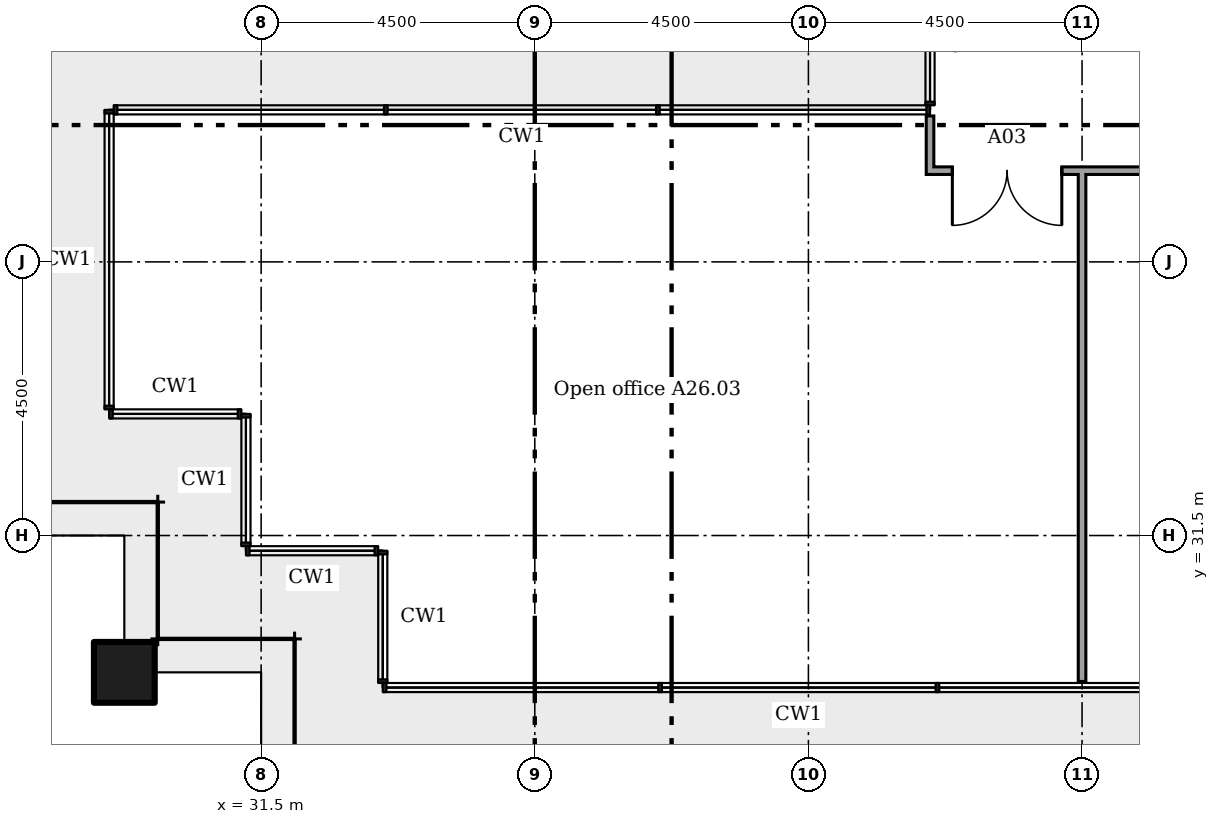
"""IFC4 building model, lengths in metres.
Left out: names, types, materials, properties, quantities, classifications, styles, units other than length and angle.
Written with IfcOpenShell. Run it as: python <this file> out.ifc"""

import sys

from ifc_helpers import new_model, si_unit, direction, frame, frame_2d, origin, origin_2d, place, context, subcontext, project, spatial, rectangle, extrude, element, fill, save


model = new_model("IFC4")
c1 = context("Model", 3, precision=1e-05, world=origin(), true_north=direction((0.0, 1.0)))
c2 = subcontext(c1, "Body", "Model", "MODEL_VIEW")
j1 = project(units=[si_unit("LENGTHUNIT", "METRE"), si_unit("PLANEANGLEUNIT", "RADIAN")], contexts=[c1])
p1 = place(None, origin())
s1 = spatial("IfcSite", under=j1, at=p1, CompositionType="ELEMENT")
p2 = place(p1, origin())
s2 = spatial("IfcBuilding", under=s1, at=p2, CompositionType="ELEMENT")
p3 = place(p2, frame((0.0, 0.0, 106.4)))
s3 = spatial("IfcBuildingStorey", under=s2, at=p3, CompositionType="ELEMENT", Elevation=106.4)
p4 = place(p3, frame((29.25, 29.25, 0.0)))
e1 = element("IfcColumn", 1, at=p4, inside=s3, PredefinedType="COLUMN", context=c2, shape_type="SweptSolid", body=[
    extrude(rectangle(XDim=1.0, YDim=1.0, at=origin_2d()), origin(), (0.0, 0.0, 1.0), 3.6),
])
p5 = place(p3, frame((42.438, 37.5, 0.0)))
e2 = element("IfcWall", 2, at=p5, inside=s3, PredefinedType="PARTITIONING", context=c2, shape_type="SweptSolid", body=[
    extrude(rectangle(XDim=18.525, YDim=0.125, at=frame_2d((9.262, 0.0))), origin(), (0.0, 0.0, 1.0), 3.45),
])
p6 = place(p5, frame((6.562, 0.0, 0.0)))
e3 = element("IfcOpeningElement", 3, at=p6, cuts=e2, PredefinedType="OPENING", context=c2, shape_type="SweptSolid", body=[
    extrude(rectangle(XDim=1.0, YDim=2.1, at=frame_2d((0.5, 1.05))), frame((0.0, 0.073, 0.0), z_axis=(0.0, -1.0, 0.0), x_axis=(1.0, 0.0, 0.0)), (0.0, 0.0, 1.0), 0.145),
])
p7 = place(p5, frame((12.857, 0.0, 0.0)))
e4 = element("IfcOpeningElement", 4, at=p7, cuts=e2, PredefinedType="OPENING", context=c2, shape_type="SweptSolid", body=[
    extrude(rectangle(XDim=1.0, YDim=2.1, at=frame_2d((0.5, 1.05))), frame((0.0, 0.073, 0.0), z_axis=(0.0, -1.0, 0.0), x_axis=(1.0, 0.0, 0.0)), (0.0, 0.0, 1.0), 0.145),
])
p8 = place(p5, frame((0.429, 0.0, 0.0)))
e5 = element("IfcOpeningElement", 5, at=p8, cuts=e2, PredefinedType="OPENING", context=c2, shape_type="SweptSolid", body=[
    extrude(rectangle(XDim=1.8, YDim=2.1, at=frame_2d((0.9, 1.05))), frame((0.0, 0.073, 0.0), z_axis=(0.0, -1.0, 0.0), x_axis=(1.0, 0.0, 0.0)), (0.0, 0.0, 1.0), 0.145),
])
p9 = place(p3, frame((42.5, 37.562, 0.0), z_axis=(0.0, 0.0, 1.0), x_axis=(0.0, 1.0, 0.0)))
e6 = element("IfcWall", 6, at=p9, inside=s3, PredefinedType="PARTITIONING", context=c2, shape_type="SweptSolid", body=[
    extrude(rectangle(XDim=0.837, YDim=0.125, at=frame_2d((0.419, 0.0))), origin(), (0.0, 0.0, 1.0), 3.45),
])
p10 = place(p3, frame((45.0, 29.1, 0.0), z_axis=(0.0, 0.0, 1.0), x_axis=(0.0, 1.0, 0.0)))
e7 = element("IfcWall", 7, at=p10, inside=s3, PredefinedType="PARTITIONING", context=c2, shape_type="SweptSolid", body=[
    extrude(rectangle(XDim=8.4, YDim=0.125, at=frame_2d((4.2, 0.0))), origin(), (0.0, 0.0, 1.0), 2.766),
])
p11 = place(p8, frame((1.8, 0.0, 0.0), x_axis=(-1.0, 0.0, 0.0)))
e8 = element("IfcDoor", 8, at=p11, inside=s3, OperationType="DOUBLE_DOOR_SINGLE_SWING", PredefinedType="DOOR", context=c2, shape_type="SweptSolid", body=[
    extrude(rectangle(XDim=1.8, YDim=2.1, at=frame_2d((0.9, 1.05))), frame((0.0, 0.025, 0.0), z_axis=(0.0, -1.0, 0.0), x_axis=(1.0, 0.0, 0.0)), (0.0, 0.0, 1.0), 0.05),
])
fill(e5, e8)
save(model, sys.argv[1])
